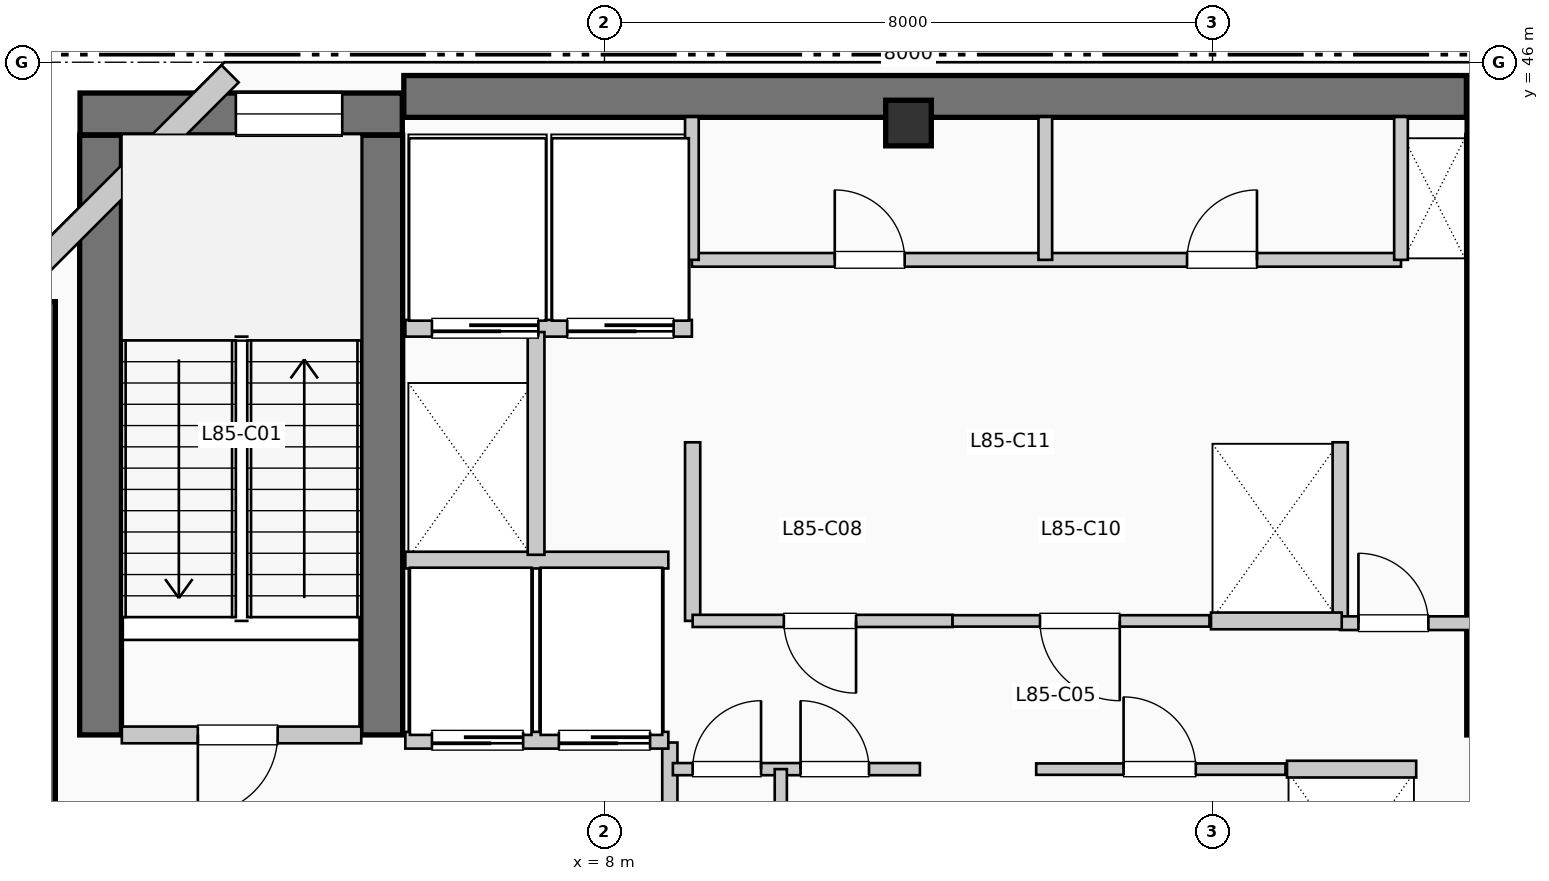
"""IFC4 building model, lengths in metres.
Left out: names, types, materials, properties, quantities, classifications, styles, units other than length and angle.
Written with IfcOpenShell. Run it as: python <this file> out.ifc"""

import sys

from ifc_helpers import new_model, si_unit, direction, frame, frame_2d, origin, origin_2d, place, context, subcontext, project, spatial, rectangle, extrude, element, fill, save


model = new_model("IFC4")
c1 = context("Model", 3, precision=1e-05, world=origin(), true_north=direction((0.0, 1.0)))
c2 = subcontext(c1, "Body", "Model", "MODEL_VIEW")
j1 = project(units=[si_unit("LENGTHUNIT", "METRE"), si_unit("PLANEANGLEUNIT", "RADIAN")], contexts=[c1])
p1 = place(None, origin())
s1 = spatial("IfcSite", under=j1, at=p1, CompositionType="ELEMENT")
p2 = place(p1, origin())
s2 = spatial("IfcBuilding", under=s1, at=p2, CompositionType="ELEMENT")
p3 = place(p2, frame((0.0, 0.0, 347.49)))
s3 = spatial("IfcBuildingStorey", under=s2, at=p3, CompositionType="ELEMENT", Elevation=347.49)
p4 = place(p3, frame((5.36, 45.55, 0.0), z_axis=(0.0, 0.0, 1.0), x_axis=(1.0, 0.0, 0.0)))
e1 = element("IfcWall", 1, at=p4, inside=s3, PredefinedType="SHEAR", context=c2, shape_type="SweptSolid", body=[
    extrude(rectangle(XDim=13.98, YDim=0.55, at=frame_2d((6.99, 0.0))), origin(), (0.0, 0.0, 1.0), 4.62),
])
p5 = place(p3, frame((0.5, 34.95, 0.0), z_axis=(0.0, 0.0, 1.0), x_axis=(0.0, 1.0, 0.0)))
e2 = element("IfcWall", 2, at=p5, inside=s3, PredefinedType="SHEAR", context=c2, shape_type="SweptSolid", body=[
    extrude(rectangle(XDim=7.9, YDim=0.55, at=frame_2d((3.95, 0.0))), origin(), (0.0, 0.0, 1.0), 4.62),
])
for number, where, z_axis, x_axis in (
    (3, (1.37, 37.15, 0.0), (0.0, 0.0, 1.0), (0.0, 1.0, 0.0)),
    (4, (5.07, 37.15, 0.0), (0.0, 0.0, 1.0), (0.0, 1.0, 0.0)),
):
    element("IfcWall", number, at=place(p3, frame(where, z_axis=z_axis, x_axis=x_axis)), inside=s3, PredefinedType="SHEAR", context=c2, shape_type="SweptSolid", body=[
        extrude(rectangle(XDim=7.89, YDim=0.55, at=frame_2d((3.945, 0.0))), origin(), (0.0, 0.0, 1.0), 4.62),
    ])
p6 = place(p3, frame((1.1, 45.32, 0.0), z_axis=(0.0, 0.0, 1.0), x_axis=(1.0, 0.0, 0.0)))
e5 = element("IfcWall", 5, at=p6, inside=s3, PredefinedType="SHEAR", context=c2, shape_type="SweptSolid", body=[
    extrude(rectangle(XDim=4.24, YDim=0.55, at=frame_2d((2.12, 0.0))), origin(), (0.0, 0.0, 1.0), 4.62),
])
p7 = place(p6, frame((2.05, 0.0, 1.05)))
e6 = element("IfcOpeningElement", 6, at=p7, cuts=e5, PredefinedType="OPENING", context=c2, shape_type="SweptSolid", body=[
    extrude(rectangle(XDim=1.4, YDim=1.8, at=frame_2d((0.7, 0.9))), frame((0.0, 0.285, 0.0), z_axis=(0.0, -1.0, 0.0), x_axis=(1.0, 0.0, 0.0)), (0.0, 0.0, 1.0), 0.57),
])
p8 = place(p3, frame((19.62, 37.15, 0.0), z_axis=(0.0, 0.0, 1.0), x_axis=(0.0, 1.0, 0.0)))
e7 = element("IfcWall", 7, at=p8, inside=s3, PredefinedType="SHEAR", context=c2, shape_type="SweptSolid", body=[
    extrude(rectangle(XDim=7.89, YDim=0.55, at=frame_2d((3.945, 0.0))), origin(), (0.0, 0.0, 1.0), 4.62),
])
p9 = place(p3, frame((19.35, 45.32, 0.0), z_axis=(0.0, 0.0, 1.0), x_axis=(1.0, 0.0, 0.0)))
e8 = element("IfcWall", 8, at=p9, inside=s3, PredefinedType="SHEAR", context=c2, shape_type="SweptSolid", body=[
    extrude(rectangle(XDim=3.69, YDim=0.55, at=frame_2d((1.845, 0.0))), origin(), (0.0, 0.0, 1.0), 4.62),
])
p10 = place(p9, frame((1.15, 0.0, 1.05)))
e9 = element("IfcOpeningElement", 9, at=p10, cuts=e8, PredefinedType="OPENING", context=c2, shape_type="SweptSolid", body=[
    extrude(rectangle(XDim=1.4, YDim=1.8, at=frame_2d((0.7, 0.9))), frame((0.0, 0.285, 0.0), z_axis=(0.0, -1.0, 0.0), x_axis=(1.0, 0.0, 0.0)), (0.0, 0.0, 1.0), 0.57),
])
p11 = place(p3, frame((12.0, 45.2, 0.0), z_axis=(0.0, 0.0, 1.0), x_axis=(1.0, 0.0, 0.0)))
e10 = element("IfcColumn", 10, at=p11, inside=s3, PredefinedType="COLUMN", context=c2, shape_type="SweptSolid", body=[
    extrude(rectangle(XDim=0.6, YDim=0.6, at=origin_2d()), origin(), (0.0, 0.0, 1.0), 4.62),
])
p12 = place(p3, frame((3.074, 45.848, 0.0), z_axis=(0.0, 0.0, 1.0), x_axis=(-0.707106781187, -0.707106781187, 0.0)))
e11 = element("IfcWall", 11, at=p12, inside=s3, PredefinedType="SOLIDWALL", context=c2, shape_type="SweptSolid", body=[
    extrude(rectangle(XDim=4.133, YDim=0.32, at=frame_2d((2.066, 0.0))), origin(), (0.0, 0.0, 1.0), 4.37),
])
p13 = place(p3, frame((1.65, 37.15, 0.0), z_axis=(0.0, 0.0, 1.0), x_axis=(1.0, 0.0, 0.0)))
e12 = element("IfcWall", 12, at=p13, inside=s3, PredefinedType="PARTITIONING", context=c2, shape_type="SweptSolid", body=[
    extrude(rectangle(XDim=3.15, YDim=0.22, at=frame_2d((1.575, 0.0))), origin(), (0.0, 0.0, 1.0), 4.37),
])
p14 = place(p13, frame((2.05, 0.0, 0.0), z_axis=(0.0, 0.0, 1.0), x_axis=(-1.0, 0.0, 0.0)))
e13 = element("IfcOpeningElement", 13, at=p14, cuts=e12, PredefinedType="OPENING", context=c2, shape_type="SweptSolid", body=[
    extrude(rectangle(XDim=1.05, YDim=2.15, at=frame_2d((0.525, 1.075))), frame((0.0, 0.12, 0.0), z_axis=(0.0, -1.0, 0.0), x_axis=(1.0, 0.0, 0.0)), (0.0, 0.0, 1.0), 0.24),
])
p15 = place(p3, frame((8.86, 34.55, 0.0), z_axis=(0.0, 0.0, 1.0), x_axis=(0.0, 1.0, 0.0)))
e14 = element("IfcWall", 14, at=p15, inside=s3, PredefinedType="PARTITIONING", context=c2, shape_type="SweptSolid", body=[
    extrude(rectangle(XDim=2.5, YDim=0.2, at=frame_2d((1.25, 0.0))), origin(), (0.0, 0.0, 1.0), 4.37),
])
p16 = place(p3, frame((5.38, 37.08, 0.0), z_axis=(0.0, 0.0, 1.0), x_axis=(1.0, 0.0, 0.0)))
e15 = element("IfcWall", 15, at=p16, inside=s3, PredefinedType="PARTITIONING", context=c2, shape_type="SweptSolid", body=[
    extrude(rectangle(XDim=3.46, YDim=0.22, at=frame_2d((1.73, 0.0))), origin(), (0.0, 0.0, 1.0), 4.37),
])
p17 = place(p16, frame((1.55, 0.0, 0.0), z_axis=(0.0, 0.0, 1.0), x_axis=(-1.0, 0.0, 0.0)))
e16 = element("IfcOpeningElement", 16, at=p17, cuts=e15, PredefinedType="OPENING", context=c2, shape_type="SweptSolid", body=[
    extrude(rectangle(XDim=1.2, YDim=2.2, at=frame_2d((0.6, 1.1))), frame((0.0, 0.12, 0.0), z_axis=(0.0, -1.0, 0.0), x_axis=(1.0, 0.0, 0.0)), (0.0, 0.0, 1.0), 0.24),
])
p18 = place(p16, frame((3.22, 0.0, 0.0), z_axis=(0.0, 0.0, 1.0), x_axis=(-1.0, 0.0, 0.0)))
e17 = element("IfcOpeningElement", 17, at=p18, cuts=e15, PredefinedType="OPENING", context=c2, shape_type="SweptSolid", body=[
    extrude(rectangle(XDim=1.2, YDim=2.2, at=frame_2d((0.6, 1.1))), frame((0.0, 0.12, 0.0), z_axis=(0.0, -1.0, 0.0), x_axis=(1.0, 0.0, 0.0)), (0.0, 0.0, 1.0), 0.24),
])
p19 = place(p3, frame((5.38, 39.45, 0.0), z_axis=(0.0, 0.0, 1.0), x_axis=(1.0, 0.0, 0.0)))
e18 = element("IfcWall", 18, at=p19, inside=s3, PredefinedType="PARTITIONING", context=c2, shape_type="SweptSolid", body=[
    extrude(rectangle(XDim=3.46, YDim=0.22, at=frame_2d((1.73, 0.0))), origin(), (0.0, 0.0, 1.0), 4.37),
])
p20 = place(p3, frame((5.38, 42.5, 0.0), z_axis=(0.0, 0.0, 1.0), x_axis=(1.0, 0.0, 0.0)))
e19 = element("IfcWall", 19, at=p20, inside=s3, PredefinedType="PARTITIONING", context=c2, shape_type="SweptSolid", body=[
    extrude(rectangle(XDim=3.77, YDim=0.22, at=frame_2d((1.885, 0.0))), origin(), (0.0, 0.0, 1.0), 4.37),
])
p21 = place(p20, frame((1.75, 0.0, 0.0), z_axis=(0.0, 0.0, 1.0), x_axis=(-1.0, 0.0, 0.0)))
e20 = element("IfcOpeningElement", 20, at=p21, cuts=e19, PredefinedType="OPENING", context=c2, shape_type="SweptSolid", body=[
    extrude(rectangle(XDim=1.4, YDim=2.2, at=frame_2d((0.7, 1.1))), frame((0.0, 0.12, 0.0), z_axis=(0.0, -1.0, 0.0), x_axis=(1.0, 0.0, 0.0)), (0.0, 0.0, 1.0), 0.24),
])
p22 = place(p20, frame((3.53, 0.0, 0.0), z_axis=(0.0, 0.0, 1.0), x_axis=(-1.0, 0.0, 0.0)))
e21 = element("IfcOpeningElement", 21, at=p22, cuts=e19, PredefinedType="OPENING", context=c2, shape_type="SweptSolid", body=[
    extrude(rectangle(XDim=1.4, YDim=2.2, at=frame_2d((0.7, 1.1))), frame((0.0, 0.12, 0.0), z_axis=(0.0, -1.0, 0.0), x_axis=(1.0, 0.0, 0.0)), (0.0, 0.0, 1.0), 0.24),
])
p23 = place(p3, frame((7.1, 39.52, 0.0), z_axis=(0.0, 0.0, 1.0), x_axis=(0.0, 1.0, 0.0)))
e22 = element("IfcWall", 22, at=p23, inside=s3, PredefinedType="PARTITIONING", context=c2, shape_type="SweptSolid", body=[
    extrude(rectangle(XDim=2.93, YDim=0.22, at=frame_2d((1.465, 0.0))), origin(), (0.0, 0.0, 1.0), 4.37),
])
for number, where, z_axis, x_axis in (
    (23, (9.16, 38.65, 0.0), (0.0, 0.0, 1.0), (0.0, 1.0, 0.0)),
    (24, (17.68, 38.65, 0.0), (0.0, 0.0, 1.0), (0.0, 1.0, 0.0)),
):
    element("IfcWall", number, at=place(p3, frame(where, z_axis=z_axis, x_axis=x_axis)), inside=s3, PredefinedType="PARTITIONING", context=c2, shape_type="SweptSolid", body=[
        extrude(rectangle(XDim=2.35, YDim=0.2, at=frame_2d((1.175, 0.0))), origin(), (0.0, 0.0, 1.0), 4.37),
    ])
p24 = place(p3, frame((17.68, 38.62, 0.0), z_axis=(0.0, 0.0, 1.0), x_axis=(1.0, 0.0, 0.0)))
e25 = element("IfcWall", 25, at=p24, inside=s3, PredefinedType="PARTITIONING", context=c2, shape_type="SweptSolid", body=[
    extrude(rectangle(XDim=1.84, YDim=0.18, at=frame_2d((0.92, 0.0))), origin(), (0.0, 0.0, 1.0), 4.37),
])
p25 = place(p24, frame((0.24, 0.0, 0.0)))
e26 = element("IfcOpeningElement", 26, at=p25, cuts=e25, PredefinedType="OPENING", context=c2, shape_type="SweptSolid", body=[
    extrude(rectangle(XDim=0.92, YDim=2.1, at=frame_2d((0.46, 1.05))), frame((0.0, 0.1, 0.0), z_axis=(0.0, -1.0, 0.0), x_axis=(1.0, 0.0, 0.0)), (0.0, 0.0, 1.0), 0.2),
])
p26 = place(p3, frame((8.9, 36.7, 0.0), z_axis=(0.0, 0.0, 1.0), x_axis=(1.0, 0.0, 0.0)))
e27 = element("IfcWall", 27, at=p26, inside=s3, PredefinedType="PARTITIONING", context=c2, shape_type="SweptSolid", body=[
    extrude(rectangle(XDim=3.25, YDim=0.16, at=frame_2d((1.625, 0.0))), origin(), (0.0, 0.0, 1.0), 4.37),
])
p27 = place(p26, frame((0.26, 0.0, 0.0)))
e28 = element("IfcOpeningElement", 28, at=p27, cuts=e27, PredefinedType="OPENING", context=c2, shape_type="SweptSolid", body=[
    extrude(rectangle(XDim=0.9, YDim=2.15, at=frame_2d((0.45, 1.075))), frame((0.0, 0.09, 0.0), z_axis=(0.0, -1.0, 0.0), x_axis=(1.0, 0.0, 0.0)), (0.0, 0.0, 1.0), 0.18),
])
p28 = place(p26, frame((1.68, 0.0, 0.0)))
e29 = element("IfcOpeningElement", 29, at=p28, cuts=e27, PredefinedType="OPENING", context=c2, shape_type="SweptSolid", body=[
    extrude(rectangle(XDim=0.9, YDim=2.15, at=frame_2d((0.45, 1.075))), frame((0.0, 0.09, 0.0), z_axis=(0.0, -1.0, 0.0), x_axis=(1.0, 0.0, 0.0)), (0.0, 0.0, 1.0), 0.18),
])
p29 = place(p3, frame((10.32, 34.55, 0.0), z_axis=(0.0, 0.0, 1.0), x_axis=(0.0, 1.0, 0.0)))
e30 = element("IfcWall", 30, at=p29, inside=s3, PredefinedType="PARTITIONING", context=c2, shape_type="SweptSolid", body=[
    extrude(rectangle(XDim=2.15, YDim=0.16, at=frame_2d((1.075, 0.0))), origin(), (0.0, 0.0, 1.0), 4.37),
])
p30 = place(p3, frame((9.16, 38.65, 0.0), z_axis=(0.0, 0.0, 1.0), x_axis=(1.0, 0.0, 0.0)))
e31 = element("IfcWall", 31, at=p30, inside=s3, PredefinedType="PARTITIONING", context=c2, shape_type="SweptSolid", body=[
    extrude(rectangle(XDim=3.42, YDim=0.16, at=frame_2d((1.71, 0.0))), origin(), (0.0, 0.0, 1.0), 4.37),
])
p31 = place(p30, frame((2.15, 0.0, 0.0), z_axis=(0.0, 0.0, 1.0), x_axis=(-1.0, 0.0, 0.0)))
e32 = element("IfcOpeningElement", 32, at=p31, cuts=e31, PredefinedType="OPENING", context=c2, shape_type="SweptSolid", body=[
    extrude(rectangle(XDim=0.95, YDim=2.15, at=frame_2d((0.475, 1.075))), frame((0.0, 0.09, 0.0), z_axis=(0.0, -1.0, 0.0), x_axis=(1.0, 0.0, 0.0)), (0.0, 0.0, 1.0), 0.18),
])
p32 = place(p3, frame((13.68, 36.7, 0.0), z_axis=(0.0, 0.0, 1.0), x_axis=(1.0, 0.0, 0.0)))
e33 = element("IfcWall", 33, at=p32, inside=s3, PredefinedType="PARTITIONING", context=c2, shape_type="SweptSolid", body=[
    extrude(rectangle(XDim=3.28, YDim=0.15, at=frame_2d((1.64, 0.0))), origin(), (0.0, 0.0, 1.0), 4.37),
])
p33 = place(p32, frame((1.15, 0.0, 0.0)))
e34 = element("IfcOpeningElement", 34, at=p33, cuts=e33, PredefinedType="OPENING", context=c2, shape_type="SweptSolid", body=[
    extrude(rectangle(XDim=0.95, YDim=2.15, at=frame_2d((0.475, 1.075))), frame((0.0, 0.085, 0.0), z_axis=(0.0, -1.0, 0.0), x_axis=(1.0, 0.0, 0.0)), (0.0, 0.0, 1.0), 0.17),
])
p34 = place(p3, frame((12.58, 38.65, 0.0), z_axis=(0.0, 0.0, 1.0), x_axis=(1.0, 0.0, 0.0)))
e35 = element("IfcWall", 35, at=p34, inside=s3, PredefinedType="PARTITIONING", context=c2, shape_type="SweptSolid", body=[
    extrude(rectangle(XDim=3.38, YDim=0.15, at=frame_2d((1.69, 0.0))), origin(), (0.0, 0.0, 1.0), 4.37),
])
p35 = place(p34, frame((2.2, 0.0, 0.0), z_axis=(0.0, 0.0, 1.0), x_axis=(-1.0, 0.0, 0.0)))
e36 = element("IfcOpeningElement", 36, at=p35, cuts=e35, PredefinedType="OPENING", context=c2, shape_type="SweptSolid", body=[
    extrude(rectangle(XDim=1.05, YDim=2.15, at=frame_2d((0.525, 1.075))), frame((0.0, 0.085, 0.0), z_axis=(0.0, -1.0, 0.0), x_axis=(1.0, 0.0, 0.0)), (0.0, 0.0, 1.0), 0.17),
])
p36 = place(p3, frame((16.98, 36.7, 0.0), z_axis=(0.0, 0.0, 1.0), x_axis=(1.0, 0.0, 0.0)))
e37 = element("IfcWall", 37, at=p36, inside=s3, PredefinedType="PARTITIONING", context=c2, shape_type="SweptSolid", body=[
    extrude(rectangle(XDim=1.7, YDim=0.22, at=frame_2d((0.85, 0.0))), origin(), (0.0, 0.0, 1.0), 4.37),
])
p37 = place(p3, frame((15.98, 38.65, 0.0), z_axis=(0.0, 0.0, 1.0), x_axis=(1.0, 0.0, 0.0)))
e38 = element("IfcWall", 38, at=p37, inside=s3, PredefinedType="PARTITIONING", context=c2, shape_type="SweptSolid", body=[
    extrude(rectangle(XDim=1.72, YDim=0.22, at=frame_2d((0.86, 0.0))), origin(), (0.0, 0.0, 1.0), 4.37),
])
p38 = place(p3, frame((9.15, 43.4, 0.0), z_axis=(0.0, 0.0, 1.0), x_axis=(1.0, 0.0, 0.0)))
e39 = element("IfcWall", 39, at=p38, inside=s3, PredefinedType="PLUMBINGWALL", context=c2, shape_type="SweptSolid", body=[
    extrude(rectangle(XDim=9.33, YDim=0.18, at=frame_2d((4.665, 0.0))), origin(), (0.0, 0.0, 1.0), 4.37),
])
p39 = place(p38, frame((1.88, 0.0, 0.0)))
e40 = element("IfcOpeningElement", 40, at=p39, cuts=e39, PredefinedType="OPENING", context=c2, shape_type="SweptSolid", body=[
    extrude(rectangle(XDim=0.92, YDim=2.1, at=frame_2d((0.46, 1.05))), frame((0.0, 0.1, 0.0), z_axis=(0.0, -1.0, 0.0), x_axis=(1.0, 0.0, 0.0)), (0.0, 0.0, 1.0), 0.2),
])
p40 = place(p38, frame((6.515, 0.0, 0.0)))
e41 = element("IfcOpeningElement", 41, at=p40, cuts=e39, PredefinedType="OPENING", context=c2, shape_type="SweptSolid", body=[
    extrude(rectangle(XDim=0.92, YDim=2.1, at=frame_2d((0.46, 1.05))), frame((0.0, 0.1, 0.0), z_axis=(0.0, -1.0, 0.0), x_axis=(1.0, 0.0, 0.0)), (0.0, 0.0, 1.0), 0.2),
])
for number, where, z_axis, x_axis in (
    (42, (9.15, 43.4, 0.0), (0.0, 0.0, 1.0), (0.0, 1.0, 0.0)),
    (43, (18.48, 43.4, 0.0), (0.0, 0.0, 1.0), (0.0, 1.0, 0.0)),
    (44, (13.8, 43.4, 0.0), (0.0, 0.0, 1.0), (0.0, 1.0, 0.0)),
):
    element("IfcWall", number, at=place(p3, frame(where, z_axis=z_axis, x_axis=x_axis)), inside=s3, PredefinedType="PLUMBINGWALL", context=c2, shape_type="SweptSolid", body=[
        extrude(rectangle(XDim=1.88, YDim=0.18, at=frame_2d((0.94, 0.0))), origin(), (0.0, 0.0, 1.0), 4.37),
    ])
p41 = place(p7, origin())
e45 = element("IfcWindow", 45, at=p41, inside=s3, PartitioningType="SINGLE_PANEL", PredefinedType="WINDOW", context=c2, shape_type="SweptSolid", body=[
    extrude(rectangle(XDim=1.4, YDim=1.8, at=frame_2d((0.7, 0.9))), frame((0.0, 0.03, 0.0), z_axis=(0.0, -1.0, 0.0), x_axis=(1.0, 0.0, 0.0)), (0.0, 0.0, 1.0), 0.06),
])
fill(e6, e45)
p42 = place(p14, origin())
e46 = element("IfcDoor", 46, at=p42, inside=s3, OperationType="SINGLE_SWING_LEFT", PredefinedType="DOOR", context=c2, shape_type="SweptSolid", body=[
    extrude(rectangle(XDim=1.05, YDim=2.15, at=frame_2d((0.525, 1.075))), frame((0.0, 0.025, 0.0), z_axis=(0.0, -1.0, 0.0), x_axis=(1.0, 0.0, 0.0)), (0.0, 0.0, 1.0), 0.05),
])
fill(e13, e46)
p43 = place(p17, origin())
e47 = element("IfcDoor", 47, at=p43, inside=s3, OperationType="SLIDING_TO_RIGHT", PredefinedType="DOOR", context=c2, shape_type="SweptSolid", body=[
    extrude(rectangle(XDim=1.2, YDim=2.2, at=frame_2d((0.6, 1.1))), frame((0.0, 0.025, 0.0), z_axis=(0.0, -1.0, 0.0), x_axis=(1.0, 0.0, 0.0)), (0.0, 0.0, 1.0), 0.05),
])
fill(e16, e47)
p44 = place(p18, origin())
e48 = element("IfcDoor", 48, at=p44, inside=s3, OperationType="SLIDING_TO_RIGHT", PredefinedType="DOOR", context=c2, shape_type="SweptSolid", body=[
    extrude(rectangle(XDim=1.2, YDim=2.2, at=frame_2d((0.6, 1.1))), frame((0.0, 0.025, 0.0), z_axis=(0.0, -1.0, 0.0), x_axis=(1.0, 0.0, 0.0)), (0.0, 0.0, 1.0), 0.05),
])
fill(e17, e48)
p45 = place(p21, origin())
e49 = element("IfcDoor", 49, at=p45, inside=s3, OperationType="SLIDING_TO_LEFT", PredefinedType="DOOR", context=c2, shape_type="SweptSolid", body=[
    extrude(rectangle(XDim=1.4, YDim=2.2, at=frame_2d((0.7, 1.1))), frame((0.0, 0.025, 0.0), z_axis=(0.0, -1.0, 0.0), x_axis=(1.0, 0.0, 0.0)), (0.0, 0.0, 1.0), 0.05),
])
fill(e20, e49)
p46 = place(p22, origin())
e50 = element("IfcDoor", 50, at=p46, inside=s3, OperationType="SLIDING_TO_LEFT", PredefinedType="DOOR", context=c2, shape_type="SweptSolid", body=[
    extrude(rectangle(XDim=1.4, YDim=2.2, at=frame_2d((0.7, 1.1))), frame((0.0, 0.025, 0.0), z_axis=(0.0, -1.0, 0.0), x_axis=(1.0, 0.0, 0.0)), (0.0, 0.0, 1.0), 0.05),
])
fill(e21, e50)
p47 = place(p25, origin())
e51 = element("IfcDoor", 51, at=p47, inside=s3, OperationType="SINGLE_SWING_LEFT", PredefinedType="DOOR", context=c2, shape_type="SweptSolid", body=[
    extrude(rectangle(XDim=0.92, YDim=2.1, at=frame_2d((0.46, 1.05))), frame((0.0, 0.025, 0.0), z_axis=(0.0, -1.0, 0.0), x_axis=(1.0, 0.0, 0.0)), (0.0, 0.0, 1.0), 0.05),
])
fill(e26, e51)
p48 = place(p27, origin())
e52 = element("IfcDoor", 52, at=p48, inside=s3, OperationType="SINGLE_SWING_RIGHT", PredefinedType="DOOR", context=c2, shape_type="SweptSolid", body=[
    extrude(rectangle(XDim=0.9, YDim=2.15, at=frame_2d((0.45, 1.075))), frame((0.0, 0.025, 0.0), z_axis=(0.0, -1.0, 0.0), x_axis=(1.0, 0.0, 0.0)), (0.0, 0.0, 1.0), 0.05),
])
fill(e28, e52)
p49 = place(p28, origin())
e53 = element("IfcDoor", 53, at=p49, inside=s3, OperationType="SINGLE_SWING_LEFT", PredefinedType="DOOR", context=c2, shape_type="SweptSolid", body=[
    extrude(rectangle(XDim=0.9, YDim=2.15, at=frame_2d((0.45, 1.075))), frame((0.0, 0.025, 0.0), z_axis=(0.0, -1.0, 0.0), x_axis=(1.0, 0.0, 0.0)), (0.0, 0.0, 1.0), 0.05),
])
fill(e29, e53)
p50 = place(p31, origin())
e54 = element("IfcDoor", 54, at=p50, inside=s3, OperationType="SINGLE_SWING_RIGHT", PredefinedType="DOOR", context=c2, shape_type="SweptSolid", body=[
    extrude(rectangle(XDim=0.95, YDim=2.15, at=frame_2d((0.475, 1.075))), frame((0.0, 0.025, 0.0), z_axis=(0.0, -1.0, 0.0), x_axis=(1.0, 0.0, 0.0)), (0.0, 0.0, 1.0), 0.05),
])
fill(e32, e54)
p51 = place(p33, origin())
e55 = element("IfcDoor", 55, at=p51, inside=s3, OperationType="SINGLE_SWING_LEFT", PredefinedType="DOOR", context=c2, shape_type="SweptSolid", body=[
    extrude(rectangle(XDim=0.95, YDim=2.15, at=frame_2d((0.475, 1.075))), frame((0.0, 0.025, 0.0), z_axis=(0.0, -1.0, 0.0), x_axis=(1.0, 0.0, 0.0)), (0.0, 0.0, 1.0), 0.05),
])
fill(e34, e55)
p52 = place(p35, origin())
e56 = element("IfcDoor", 56, at=p52, inside=s3, OperationType="SINGLE_SWING_RIGHT", PredefinedType="DOOR", context=c2, shape_type="SweptSolid", body=[
    extrude(rectangle(XDim=1.05, YDim=2.15, at=frame_2d((0.525, 1.075))), frame((0.0, 0.025, 0.0), z_axis=(0.0, -1.0, 0.0), x_axis=(1.0, 0.0, 0.0)), (0.0, 0.0, 1.0), 0.05),
])
fill(e36, e56)
p53 = place(p39, origin())
e57 = element("IfcDoor", 57, at=p53, inside=s3, OperationType="SINGLE_SWING_LEFT", PredefinedType="DOOR", context=c2, shape_type="SweptSolid", body=[
    extrude(rectangle(XDim=0.92, YDim=2.1, at=frame_2d((0.46, 1.05))), frame((0.0, 0.025, 0.0), z_axis=(0.0, -1.0, 0.0), x_axis=(1.0, 0.0, 0.0)), (0.0, 0.0, 1.0), 0.05),
])
fill(e40, e57)
p54 = place(p40, origin())
e58 = element("IfcDoor", 58, at=p54, inside=s3, OperationType="SINGLE_SWING_RIGHT", PredefinedType="DOOR", context=c2, shape_type="SweptSolid", body=[
    extrude(rectangle(XDim=0.92, YDim=2.1, at=frame_2d((0.46, 1.05))), frame((0.0, 0.025, 0.0), z_axis=(0.0, -1.0, 0.0), x_axis=(1.0, 0.0, 0.0)), (0.0, 0.0, 1.0), 0.05),
])
fill(e41, e58)
save(model, sys.argv[1])
